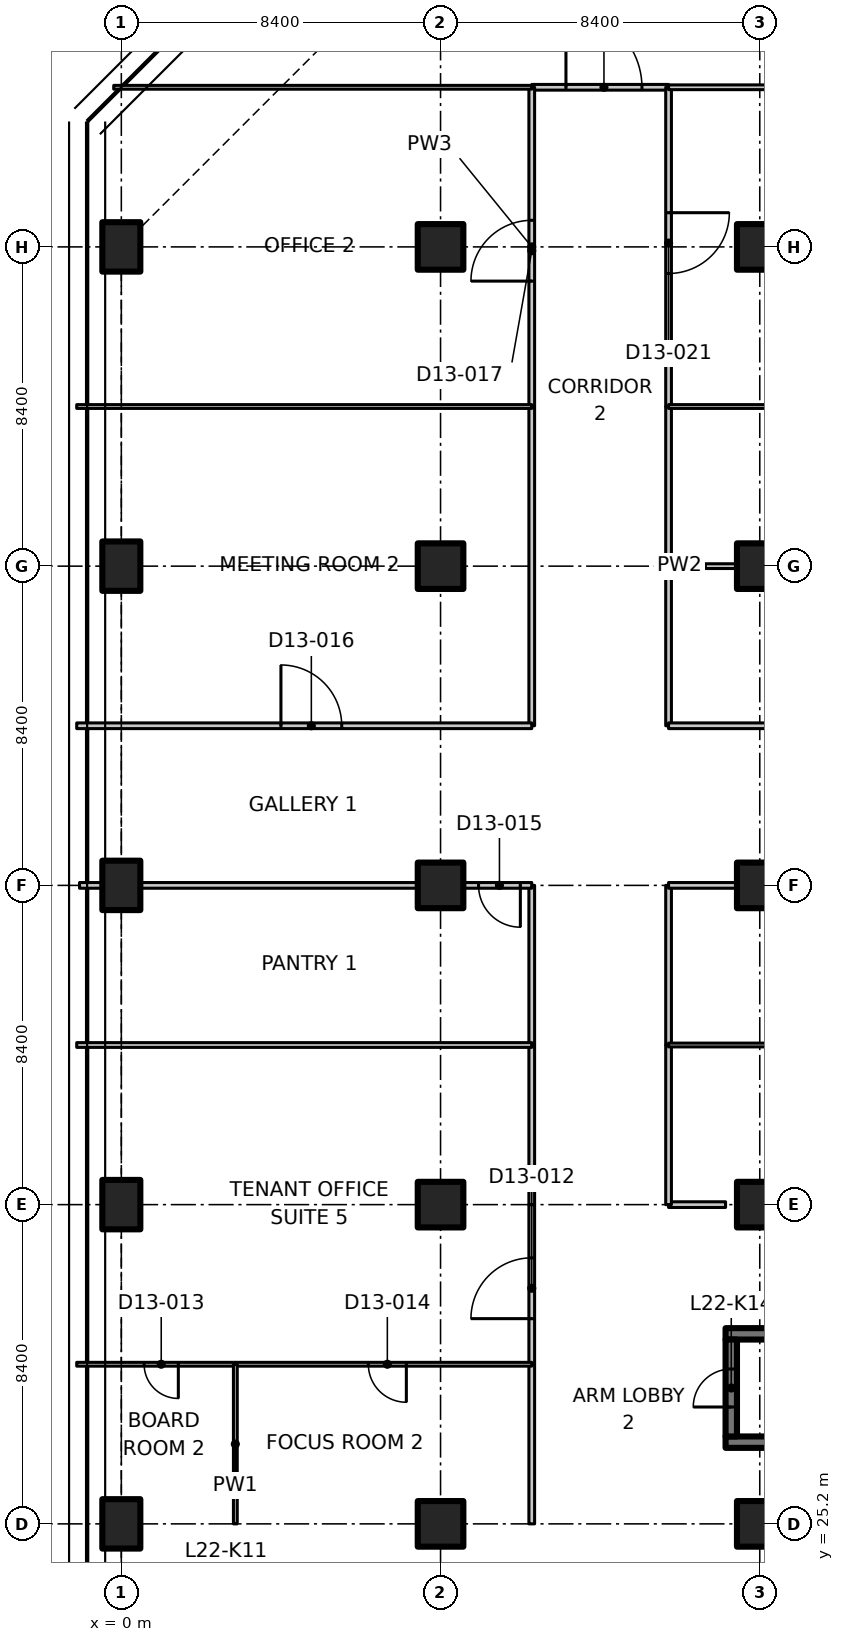
"""IFC4 building model, lengths in metres.
Left out: names, types, materials, properties, quantities, classifications, styles, units other than length and angle.
Written with IfcOpenShell. Run it as: python <this file> out.ifc"""

import sys

from ifc_helpers import new_model, si_unit, direction, frame, frame_2d, origin, origin_2d, place, context, subcontext, project, spatial, polyline, rectangle, outline, extrude, element, fill, save


model = new_model("IFC4")
c1 = context("Model", 3, precision=1e-05, world=origin(), true_north=direction((0.0, 1.0)))
c2 = subcontext(c1, "Body", "Model", "MODEL_VIEW")
j1 = project(units=[si_unit("LENGTHUNIT", "METRE"), si_unit("PLANEANGLEUNIT", "RADIAN")], contexts=[c1])
p1 = place(None, origin())
s1 = spatial("IfcSite", under=j1, at=p1, CompositionType="ELEMENT")
p2 = place(p1, origin())
s2 = spatial("IfcBuilding", under=s1, at=p2, CompositionType="ELEMENT")
p3 = place(p2, frame((0.0, 0.0, 95.3)))
s3 = spatial("IfcBuildingStorey", under=s2, at=p3, CompositionType="ELEMENT", Elevation=95.3)
for number, where, z_axis, x_axis in (
    (1, (0.0, 25.2, 0.0), (0.0, 0.0, 1.0), (1.0, 0.0, 0.0)),
    (2, (0.0, 33.6, 0.0), (0.0, 0.0, 1.0), (1.0, 0.0, 0.0)),
    (3, (0.0, 42.0, 0.0), (0.0, 0.0, 1.0), (1.0, 0.0, 0.0)),
    (4, (0.0, 50.4, 0.0), (0.0, 0.0, 1.0), (1.0, 0.0, 0.0)),
    (5, (0.0, 58.8, 0.0), (0.0, 0.0, 1.0), (1.0, 0.0, 0.0)),
):
    element("IfcColumn", number, at=place(p3, frame(where, z_axis=z_axis, x_axis=x_axis)), inside=s3, PredefinedType="COLUMN", context=c2, shape_type="SweptSolid", body=[
        extrude(rectangle(XDim=1.0, YDim=1.3, at=origin_2d()), origin(), (0.0, 0.0, 1.0), 3.35),
    ])
for number, where, z_axis, x_axis in (
    (6, (8.4, 25.2, 0.0), (0.0, 0.0, 1.0), (1.0, 0.0, 0.0)),
    (7, (8.4, 33.6, 0.0), (0.0, 0.0, 1.0), (1.0, 0.0, 0.0)),
    (8, (8.4, 42.0, 0.0), (0.0, 0.0, 1.0), (1.0, 0.0, 0.0)),
    (9, (8.4, 50.4, 0.0), (0.0, 0.0, 1.0), (1.0, 0.0, 0.0)),
    (10, (8.4, 58.8, 0.0), (0.0, 0.0, 1.0), (1.0, 0.0, 0.0)),
    (11, (16.8, 25.2, 0.0), (0.0, 0.0, 1.0), (1.0, 0.0, 0.0)),
    (12, (16.8, 33.6, 0.0), (0.0, 0.0, 1.0), (1.0, 0.0, 0.0)),
    (13, (16.8, 42.0, 0.0), (0.0, 0.0, 1.0), (1.0, 0.0, 0.0)),
    (14, (16.8, 50.4, 0.0), (0.0, 0.0, 1.0), (1.0, 0.0, 0.0)),
    (15, (16.8, 58.8, 0.0), (0.0, 0.0, 1.0), (1.0, 0.0, 0.0)),
):
    element("IfcColumn", number, at=place(p3, frame(where, z_axis=z_axis, x_axis=x_axis)), inside=s3, PredefinedType="COLUMN", context=c2, shape_type="SweptSolid", body=[
        extrude(rectangle(XDim=1.2, YDim=1.2, at=origin_2d()), origin(), (0.0, 0.0, 1.0), 3.35),
    ])
for number, where, z_axis, x_axis in (
    (16, (15.9, 27.35, 0.0), (0.0, 0.0, 1.0), (1.0, 0.0, 0.0)),
    (17, (15.9, 30.2, 0.0), (0.0, 0.0, 1.0), (1.0, 0.0, 0.0)),
):
    element("IfcWall", number, at=place(p3, frame(where, z_axis=z_axis, x_axis=x_axis)), inside=s3, PredefinedType="SHEAR", context=c2, shape_type="SweptSolid", body=[
        extrude(rectangle(XDim=8.2, YDim=0.3, at=frame_2d((4.1, 0.0))), origin(), (0.0, 0.0, 1.0), 3.35),
    ])
p4 = place(p3, frame((16.05, 27.5, 0.0), z_axis=(0.0, 0.0, 1.0), x_axis=(0.0, 1.0, 0.0)))
e18 = element("IfcWall", 18, at=p4, inside=s3, PredefinedType="SHEAR", context=c2, shape_type="SweptSolid", body=[
    extrude(rectangle(XDim=2.55, YDim=0.3, at=frame_2d((1.275, 0.0))), origin(), (0.0, 0.0, 1.0), 3.35),
])
p5 = place(p4, frame((0.775, 0.0, 0.0)))
e19 = element("IfcOpeningElement", 19, at=p5, cuts=e18, PredefinedType="OPENING", context=c2, shape_type="SweptSolid", body=[
    extrude(rectangle(XDim=1.0, YDim=2.1, at=frame_2d((0.5, 1.05))), frame((0.0, 0.16, 0.0), z_axis=(0.0, -1.0, 0.0), x_axis=(1.0, 0.0, 0.0)), (0.0, 0.0, 1.0), 0.32),
])
p6 = place(p3, frame((10.8, 29.4, 0.0), z_axis=(0.0, 0.0, 1.0), x_axis=(0.0, 1.0, 0.0)))
e20 = element("IfcWall", 20, at=p6, inside=s3, PredefinedType="PARTITIONING", context=c2, shape_type="SweptSolid", body=[
    extrude(rectangle(XDim=4.2, YDim=0.15, at=frame_2d((2.1, 0.0))), origin(), (0.0, 0.0, 1.0), 3.33),
])
p7 = place(p6, frame((1.2, 0.0, 0.0)))
e21 = element("IfcOpeningElement", 21, at=p7, cuts=e20, PredefinedType="OPENING", context=c2, shape_type="SweptSolid", body=[
    extrude(rectangle(XDim=1.6, YDim=2.1, at=frame_2d((0.8, 1.05))), frame((0.0, 0.085, 0.0), z_axis=(0.0, -1.0, 0.0), x_axis=(1.0, 0.0, 0.0)), (0.0, 0.0, 1.0), 0.17),
])
p8 = place(p3, frame((10.8, 25.2, 0.0), z_axis=(0.0, 0.0, 1.0), x_axis=(0.0, 1.0, 0.0)))
e22 = element("IfcWall", 22, at=p8, inside=s3, PredefinedType="PARTITIONING", context=c2, shape_type="SweptSolid", body=[
    extrude(rectangle(XDim=4.2, YDim=0.15, at=frame_2d((2.1, 0.0))), origin(), (0.0, 0.0, 1.0), 3.33),
])
p9 = place(p3, frame((14.4, 33.6, 0.0), z_axis=(0.0, 0.0, 1.0), x_axis=(1.0, 0.0, 0.0)))
e23 = element("IfcWall", 23, at=p9, inside=s3, PredefinedType="PARTITIONING", context=c2, shape_type="SweptSolid", body=[
    extrude(rectangle(XDim=1.5, YDim=0.15, at=frame_2d((0.75, 0.0))), origin(), (0.0, 0.0, 1.0), 3.33),
])
p10 = place(p3, frame((10.8, 63.0, 0.0), z_axis=(0.0, 0.0, 1.0), x_axis=(1.0, 0.0, 0.0)))
e24 = element("IfcWall", 24, at=p10, inside=s3, PredefinedType="PARTITIONING", context=c2, shape_type="SweptSolid", body=[
    extrude(rectangle(XDim=3.6, YDim=0.15, at=frame_2d((1.8, 0.0))), origin(), (0.0, 0.0, 1.0), 3.33),
])
p11 = place(p10, frame((0.9, 0.0, 0.0)))
e25 = element("IfcOpeningElement", 25, at=p11, cuts=e24, PredefinedType="OPENING", context=c2, shape_type="SweptSolid", body=[
    extrude(rectangle(XDim=2.0, YDim=2.4, at=frame_2d((1.0, 1.2))), frame((0.0, 0.085, 0.0), z_axis=(0.0, -1.0, 0.0), x_axis=(1.0, 0.0, 0.0)), (0.0, 0.0, 1.0), 0.17),
])
for number, where, z_axis, x_axis in (
    (26, (10.8, 33.6, 0.0), (0.0, 0.0, 1.0), (0.0, 1.0, 0.0)),
    (27, (10.8, 37.8, 0.0), (0.0, 0.0, 1.0), (0.0, 1.0, 0.0)),
):
    element("IfcWall", number, at=place(p3, frame(where, z_axis=z_axis, x_axis=x_axis)), inside=s3, PredefinedType="PARTITIONING", context=c2, shape_type="SweptSolid", body=[
        extrude(rectangle(XDim=4.2, YDim=0.15, at=frame_2d((2.1, 0.0))), origin(), (0.0, 0.0, 1.0), 3.33),
    ])
p12 = place(p3, frame((10.8, 46.2, 0.0), z_axis=(0.0, 0.0, 1.0), x_axis=(0.0, 1.0, 0.0)))
e28 = element("IfcWall", 28, at=p12, inside=s3, PredefinedType="PARTITIONING", context=c2, shape_type="SweptSolid", body=[
    extrude(rectangle(XDim=8.4, YDim=0.15, at=frame_2d((4.2, 0.0))), origin(), (0.0, 0.0, 1.0), 3.33),
])
p13 = place(p3, frame((10.8, 54.6, 0.0), z_axis=(0.0, 0.0, 1.0), x_axis=(0.0, 1.0, 0.0)))
e29 = element("IfcWall", 29, at=p13, inside=s3, PredefinedType="PARTITIONING", context=c2, shape_type="SweptSolid", body=[
    extrude(rectangle(XDim=8.4, YDim=0.15, at=frame_2d((4.2, 0.0))), origin(), (0.0, 0.0, 1.0), 3.33),
])
p14 = place(p13, frame((3.3, 0.0, 0.0)))
e30 = element("IfcOpeningElement", 30, at=p14, cuts=e29, PredefinedType="OPENING", context=c2, shape_type="SweptSolid", body=[
    extrude(rectangle(XDim=1.6, YDim=2.1, at=frame_2d((0.8, 1.05))), frame((0.0, 0.085, 0.0), z_axis=(0.0, -1.0, 0.0), x_axis=(1.0, 0.0, 0.0)), (0.0, 0.0, 1.0), 0.17),
])
for number, where, z_axis, x_axis in (
    (31, (14.4, 37.8, 0.0), (0.0, 0.0, 1.0), (0.0, -1.0, 0.0)),
    (32, (14.4, 42.0, 0.0), (0.0, 0.0, 1.0), (0.0, -1.0, 0.0)),
    (33, (14.4, 50.4, 0.0), (0.0, 0.0, 1.0), (0.0, -1.0, 0.0)),
):
    element("IfcWall", number, at=place(p3, frame(where, z_axis=z_axis, x_axis=x_axis)), inside=s3, PredefinedType="PARTITIONING", context=c2, shape_type="SweptSolid", body=[
        extrude(rectangle(XDim=4.2, YDim=0.15, at=frame_2d((2.1, 0.0))), origin(), (0.0, 0.0, 1.0), 3.33),
    ])
p15 = place(p3, frame((14.4, 63.0, 0.0), z_axis=(0.0, 0.0, 1.0), x_axis=(0.0, -1.0, 0.0)))
e34 = element("IfcWall", 34, at=p15, inside=s3, PredefinedType="PARTITIONING", context=c2, shape_type="SweptSolid", body=[
    extrude(rectangle(XDim=8.4, YDim=0.15, at=frame_2d((4.2, 0.0))), origin(), (0.0, 0.0, 1.0), 3.33),
])
p16 = place(p15, frame((3.3, 0.0, 0.0)))
e35 = element("IfcOpeningElement", 35, at=p16, cuts=e34, PredefinedType="OPENING", context=c2, shape_type="SweptSolid", body=[
    extrude(rectangle(XDim=1.6, YDim=2.1, at=frame_2d((0.8, 1.05))), frame((0.0, 0.085, 0.0), z_axis=(0.0, -1.0, 0.0), x_axis=(1.0, 0.0, 0.0)), (0.0, 0.0, 1.0), 0.17),
])
p17 = place(p3, frame((14.4, 54.6, 0.0), z_axis=(0.0, 0.0, 1.0), x_axis=(0.0, -1.0, 0.0)))
e36 = element("IfcWall", 36, at=p17, inside=s3, PredefinedType="PARTITIONING", context=c2, shape_type="SweptSolid", body=[
    extrude(rectangle(XDim=4.2, YDim=0.15, at=frame_2d((2.1, 0.0))), origin(), (0.0, 0.0, 1.0), 3.33),
])
p18 = place(p3, frame((10.8, 63.0, 0.0), z_axis=(0.0, 0.0, 1.0), x_axis=(-1.0, 0.0, 0.0)))
e37 = element("IfcWall", 37, at=p18, inside=s3, PredefinedType="PARTITIONING", context=c2, shape_type="SweptSolid", body=[
    extrude(outline(polyline([(0.0, 0.0), (11.0, 0.0), (11.0, 3.33), (7.266, 3.33), (7.264, 2.98), (5.936, 2.98), (5.934, 3.33), (0.0, 3.33), (0.0, 0.0)])), frame((0.0, 0.05, 0.0), z_axis=(0.0, -1.0, 0.0), x_axis=(1.0, 0.0, 0.0)), (0.0, 0.0, 1.0), 0.1),
])
p19 = place(p3, frame((25.4, 63.0, 0.0), z_axis=(0.0, 0.0, 1.0), x_axis=(-1.0, 0.0, 0.0)))
e38 = element("IfcWall", 38, at=p19, inside=s3, PredefinedType="PARTITIONING", context=c2, shape_type="SweptSolid", body=[
    extrude(outline(polyline([(0.0, 0.0), (11.0, 0.0), (11.0, 3.33), (5.078, 3.33), (5.076, 2.98), (3.724, 2.98), (3.722, 3.33), (0.0, 3.33), (0.0, 0.0)])), frame((0.0, 0.062, 0.0), z_axis=(0.0, -1.0, 0.0), x_axis=(1.0, 0.0, 0.0)), (0.0, 0.0, 1.0), 0.125),
])
p20 = place(p3, frame((10.8, 42.0, 0.0), z_axis=(0.0, 0.0, 1.0), x_axis=(-1.0, 0.0, 0.0)))
e39 = element("IfcWall", 39, at=p20, inside=s3, PredefinedType="PARTITIONING", context=c2, shape_type="SweptSolid", body=[
    extrude(rectangle(XDim=1.78, YDim=0.15, at=frame_2d((0.89, 0.0))), origin(), (0.0, 0.0, 1.0), 3.33),
])
p21 = place(p20, frame((0.3, 0.0, 0.0)))
e40 = element("IfcOpeningElement", 40, at=p21, cuts=e39, PredefinedType="OPENING", context=c2, shape_type="SweptSolid", body=[
    extrude(rectangle(XDim=1.1, YDim=2.1, at=frame_2d((0.55, 1.05))), frame((0.0, 0.085, 0.0), z_axis=(0.0, -1.0, 0.0), x_axis=(1.0, 0.0, 0.0)), (0.0, 0.0, 1.0), 0.17),
])
p22 = place(p3, frame((7.78, 42.0, 0.0), z_axis=(0.0, 0.0, 1.0), x_axis=(-1.0, 0.0, 0.0)))
e41 = element("IfcWall", 41, at=p22, inside=s3, PredefinedType="PARTITIONING", context=c2, shape_type="SweptSolid", body=[
    extrude(rectangle(XDim=7.26, YDim=0.15, at=frame_2d((3.63, 0.0))), origin(), (0.0, 0.0, 1.0), 3.33),
])
p23 = place(p3, frame((-0.52, 42.0, 0.0), z_axis=(0.0, 0.0, 1.0), x_axis=(-1.0, 0.0, 0.0)))
e42 = element("IfcWall", 42, at=p23, inside=s3, PredefinedType="PARTITIONING", context=c2, shape_type="SweptSolid", body=[
    extrude(rectangle(XDim=0.58, YDim=0.15, at=frame_2d((0.29, 0.0))), origin(), (0.0, 0.0, 1.0), 3.33),
])
p24 = place(p3, frame((-1.174, 46.2, 0.0), z_axis=(0.0, 0.0, 1.0), x_axis=(1.0, 0.0, 0.0)))
e43 = element("IfcWall", 43, at=p24, inside=s3, PredefinedType="PARTITIONING", context=c2, shape_type="SweptSolid", body=[
    extrude(outline(polyline([(0.0, 0.0), (11.974, 0.0), (11.974, 3.33), (1.624, 3.33), (1.622, 2.98), (0.726, 2.98), (0.724, 3.33), (0.074, 3.33), (0.0, 3.33), (0.0, 0.0)])), frame((0.0, 0.075, 0.0), z_axis=(0.0, -1.0, 0.0), x_axis=(1.0, 0.0, 0.0)), (0.0, 0.0, 1.0), 0.15),
])
p25 = place(p24, frame((5.374, 0.0, 0.0)))
e44 = element("IfcOpeningElement", 44, at=p25, cuts=e43, PredefinedType="OPENING", context=c2, shape_type="SweptSolid", body=[
    extrude(rectangle(XDim=1.6, YDim=2.1, at=frame_2d((0.8, 1.05))), frame((0.0, 0.085, 0.0), z_axis=(0.0, -1.0, 0.0), x_axis=(1.0, 0.0, 0.0)), (0.0, 0.0, 1.0), 0.17),
])
p26 = place(p3, frame((3.0, 29.4, 0.0), z_axis=(0.0, 0.0, 1.0), x_axis=(-1.0, 0.0, 0.0)))
e45 = element("IfcWall", 45, at=p26, inside=s3, PredefinedType="PARTITIONING", context=c2, shape_type="SweptSolid", body=[
    extrude(rectangle(XDim=4.174, YDim=0.1, at=frame_2d((2.087, 0.0))), origin(), (0.0, 0.0, 1.0), 2.98),
])
p27 = place(p26, frame((1.5, 0.0, 0.0)))
e46 = element("IfcOpeningElement", 46, at=p27, cuts=e45, PredefinedType="OPENING", context=c2, shape_type="SweptSolid", body=[
    extrude(rectangle(XDim=0.9, YDim=2.1, at=frame_2d((0.45, 1.05))), frame((0.0, 0.06, 0.0), z_axis=(0.0, -1.0, 0.0), x_axis=(1.0, 0.0, 0.0)), (0.0, 0.0, 1.0), 0.12),
])
p28 = place(p3, frame((10.8, 29.4, 0.0), z_axis=(0.0, 0.0, 1.0), x_axis=(-1.0, 0.0, 0.0)))
e47 = element("IfcWall", 47, at=p28, inside=s3, PredefinedType="PARTITIONING", context=c2, shape_type="SweptSolid", body=[
    extrude(rectangle(XDim=7.8, YDim=0.1, at=frame_2d((3.9, 0.0))), origin(), (0.0, 0.0, 1.0), 3.33),
])
p29 = place(p28, frame((3.3, 0.0, 0.0)))
e48 = element("IfcOpeningElement", 48, at=p29, cuts=e47, PredefinedType="OPENING", context=c2, shape_type="SweptSolid", body=[
    extrude(rectangle(XDim=1.0, YDim=2.1, at=frame_2d((0.5, 1.05))), frame((0.0, 0.06, 0.0), z_axis=(0.0, -1.0, 0.0), x_axis=(1.0, 0.0, 0.0)), (0.0, 0.0, 1.0), 0.12),
])
p30 = place(p3, frame((-1.174, 37.8, 0.0), z_axis=(0.0, 0.0, 1.0), x_axis=(1.0, 0.0, 0.0)))
e49 = element("IfcWall", 49, at=p30, inside=s3, PredefinedType="PARTITIONING", context=c2, shape_type="SweptSolid", body=[
    extrude(outline(polyline([(0.0, 0.0), (11.974, 0.0), (11.974, 3.33), (1.624, 3.33), (1.622, 2.98), (0.726, 2.98), (0.724, 3.33), (0.074, 3.33), (0.0, 3.33), (0.0, 0.0)])), frame((0.0, 0.062, 0.0), z_axis=(0.0, -1.0, 0.0), x_axis=(1.0, 0.0, 0.0)), (0.0, 0.0, 1.0), 0.125),
])
p31 = place(p3, frame((3.0, 29.4, 0.0), z_axis=(0.0, 0.0, 1.0), x_axis=(0.0, -1.0, 0.0)))
e50 = element("IfcWall", 50, at=p31, inside=s3, PredefinedType="PARTITIONING", context=c2, shape_type="SweptSolid", body=[
    extrude(rectangle(XDim=4.2, YDim=0.1, at=frame_2d((2.1, 0.0))), origin(), (0.0, 0.0, 1.0), 3.33),
])
p32 = place(p3, frame((-1.174, 54.6, 0.0), z_axis=(0.0, 0.0, 1.0), x_axis=(1.0, 0.0, 0.0)))
e51 = element("IfcWall", 51, at=p32, inside=s3, PredefinedType="PARTITIONING", context=c2, shape_type="SweptSolid", body=[
    extrude(outline(polyline([(0.0, 0.0), (11.974, 0.0), (11.974, 3.33), (1.624, 3.33), (1.622, 2.98), (0.726, 2.98), (0.724, 3.33), (0.074, 3.33), (0.0, 3.33), (0.0, 0.0)])), frame((0.0, 0.05, 0.0), z_axis=(0.0, -1.0, 0.0), x_axis=(1.0, 0.0, 0.0)), (0.0, 0.0, 1.0), 0.1),
])
p33 = place(p3, frame((16.18, 42.0, 0.0), z_axis=(0.0, 0.0, 1.0), x_axis=(-1.0, 0.0, 0.0)))
e52 = element("IfcWall", 52, at=p33, inside=s3, PredefinedType="PARTITIONING", context=c2, shape_type="SweptSolid", body=[
    extrude(rectangle(XDim=1.78, YDim=0.15, at=frame_2d((0.89, 0.0))), origin(), (0.0, 0.0, 1.0), 3.33),
])
p34 = place(p3, frame((14.4, 46.2, 0.0), z_axis=(0.0, 0.0, 1.0), x_axis=(1.0, 0.0, 0.0)))
e53 = element("IfcWall", 53, at=p34, inside=s3, PredefinedType="PARTITIONING", context=c2, shape_type="SweptSolid", body=[
    extrude(outline(polyline([(0.0, 0.0), (11.974, 0.0), (11.974, 3.33), (11.9, 3.33), (11.25, 3.33), (11.248, 2.98), (10.352, 2.98), (10.35, 3.33), (0.0, 3.33), (0.0, 0.0)])), frame((0.0, 0.075, 0.0), z_axis=(0.0, -1.0, 0.0), x_axis=(1.0, 0.0, 0.0)), (0.0, 0.0, 1.0), 0.15),
])
p35 = place(p34, frame((5.4, 0.0, 0.0)))
e54 = element("IfcOpeningElement", 54, at=p35, cuts=e53, PredefinedType="OPENING", context=c2, shape_type="SweptSolid", body=[
    extrude(rectangle(XDim=1.1, YDim=2.1, at=frame_2d((0.55, 1.05))), frame((0.0, 0.085, 0.0), z_axis=(0.0, -1.0, 0.0), x_axis=(1.0, 0.0, 0.0)), (0.0, 0.0, 1.0), 0.17),
])
p36 = place(p3, frame((14.4, 37.8, 0.0), z_axis=(0.0, 0.0, 1.0), x_axis=(1.0, 0.0, 0.0)))
e55 = element("IfcWall", 55, at=p36, inside=s3, PredefinedType="PARTITIONING", context=c2, shape_type="SweptSolid", body=[
    extrude(outline(polyline([(0.0, 0.0), (15.843, 0.0), (15.843, 3.33), (11.25, 3.33), (11.248, 2.98), (10.352, 2.98), (10.35, 3.33), (0.0, 3.33), (0.0, 0.0)])), frame((0.0, 0.05, 0.0), z_axis=(0.0, -1.0, 0.0), x_axis=(1.0, 0.0, 0.0)), (0.0, 0.0, 1.0), 0.1),
])
p37 = place(p3, frame((14.4, 50.4, 0.0), z_axis=(0.0, 0.0, 1.0), x_axis=(1.0, 0.0, 0.0)))
e56 = element("IfcWall", 56, at=p37, inside=s3, PredefinedType="PARTITIONING", context=c2, shape_type="SweptSolid", body=[
    extrude(rectangle(XDim=1.78, YDim=0.125, at=frame_2d((0.89, 0.0))), origin(), (0.0, 0.0, 1.0), 3.33),
])
p38 = place(p3, frame((24.0, 54.6, 0.0), z_axis=(0.0, 0.0, 1.0), x_axis=(-1.0, 0.0, 0.0)))
e57 = element("IfcWall", 57, at=p38, inside=s3, PredefinedType="PARTITIONING", context=c2, shape_type="SweptSolid", body=[
    extrude(rectangle(XDim=9.6, YDim=0.1, at=frame_2d((4.8, 0.0))), origin(), (0.0, 0.0, 1.0), 3.33),
])
p39 = place(p38, frame((4.2, 0.0, 0.0)))
e58 = element("IfcOpeningElement", 58, at=p39, cuts=e57, PredefinedType="OPENING", context=c2, shape_type="SweptSolid", body=[
    extrude(rectangle(XDim=1.2, YDim=2.1, at=frame_2d((0.6, 1.05))), frame((0.0, 0.06, 0.0), z_axis=(0.0, -1.0, 0.0), x_axis=(1.0, 0.0, 0.0)), (0.0, 0.0, 1.0), 0.12),
])
p40 = place(p5, origin())
e59 = element("IfcDoor", 59, at=p40, inside=s3, OperationType="SINGLE_SWING_LEFT", PredefinedType="DOOR", context=c2, shape_type="SweptSolid", body=[
    extrude(rectangle(XDim=1.0, YDim=2.1, at=frame_2d((0.5, 1.05))), frame((0.0, 0.025, 0.0), z_axis=(0.0, -1.0, 0.0), x_axis=(1.0, 0.0, 0.0)), (0.0, 0.0, 1.0), 0.05),
])
fill(e19, e59)
p41 = place(p11, origin())
e60 = element("IfcDoor", 60, at=p41, inside=s3, OperationType="DOUBLE_DOOR_SINGLE_SWING", PredefinedType="DOOR", context=c2, shape_type="SweptSolid", body=[
    extrude(rectangle(XDim=2.0, YDim=2.4, at=frame_2d((1.0, 1.2))), frame((0.0, 0.025, 0.0), z_axis=(0.0, -1.0, 0.0), x_axis=(1.0, 0.0, 0.0)), (0.0, 0.0, 1.0), 0.05),
])
fill(e25, e60)
p42 = place(p7, origin())
e61 = element("IfcDoor", 61, at=p42, inside=s3, OperationType="DOUBLE_DOOR_SINGLE_SWING", PredefinedType="DOOR", context=c2, shape_type="SweptSolid", body=[
    extrude(rectangle(XDim=1.6, YDim=2.1, at=frame_2d((0.8, 1.05))), frame((0.0, 0.025, 0.0), z_axis=(0.0, -1.0, 0.0), x_axis=(1.0, 0.0, 0.0)), (0.0, 0.0, 1.0), 0.05),
])
fill(e21, e61)
p43 = place(p27, origin())
e62 = element("IfcDoor", 62, at=p43, inside=s3, OperationType="SINGLE_SWING_LEFT", PredefinedType="DOOR", context=c2, shape_type="SweptSolid", body=[
    extrude(rectangle(XDim=0.9, YDim=2.1, at=frame_2d((0.45, 1.05))), frame((0.0, 0.025, 0.0), z_axis=(0.0, -1.0, 0.0), x_axis=(1.0, 0.0, 0.0)), (0.0, 0.0, 1.0), 0.05),
])
fill(e46, e62)
p44 = place(p29, origin())
e63 = element("IfcDoor", 63, at=p44, inside=s3, OperationType="SINGLE_SWING_LEFT", PredefinedType="DOOR", context=c2, shape_type="SweptSolid", body=[
    extrude(rectangle(XDim=1.0, YDim=2.1, at=frame_2d((0.5, 1.05))), frame((0.0, 0.025, 0.0), z_axis=(0.0, -1.0, 0.0), x_axis=(1.0, 0.0, 0.0)), (0.0, 0.0, 1.0), 0.05),
])
fill(e48, e63)
p45 = place(p21, origin())
e64 = element("IfcDoor", 64, at=p45, inside=s3, OperationType="SINGLE_SWING_LEFT", PredefinedType="DOOR", context=c2, shape_type="SweptSolid", body=[
    extrude(rectangle(XDim=1.1, YDim=2.1, at=frame_2d((0.55, 1.05))), frame((0.0, 0.025, 0.0), z_axis=(0.0, -1.0, 0.0), x_axis=(1.0, 0.0, 0.0)), (0.0, 0.0, 1.0), 0.05),
])
fill(e40, e64)
p46 = place(p25, origin())
e65 = element("IfcDoor", 65, at=p46, inside=s3, OperationType="DOUBLE_DOOR_SINGLE_SWING", PredefinedType="DOOR", context=c2, shape_type="SweptSolid", body=[
    extrude(rectangle(XDim=1.6, YDim=2.1, at=frame_2d((0.8, 1.05))), frame((0.0, 0.025, 0.0), z_axis=(0.0, -1.0, 0.0), x_axis=(1.0, 0.0, 0.0)), (0.0, 0.0, 1.0), 0.05),
])
fill(e44, e65)
p47 = place(p14, origin())
e66 = element("IfcDoor", 66, at=p47, inside=s3, OperationType="DOUBLE_DOOR_SINGLE_SWING", PredefinedType="DOOR", context=c2, shape_type="SweptSolid", body=[
    extrude(rectangle(XDim=1.6, YDim=2.1, at=frame_2d((0.8, 1.05))), frame((0.0, 0.025, 0.0), z_axis=(0.0, -1.0, 0.0), x_axis=(1.0, 0.0, 0.0)), (0.0, 0.0, 1.0), 0.05),
])
fill(e30, e66)
p48 = place(p16, origin())
e67 = element("IfcDoor", 67, at=p48, inside=s3, OperationType="DOUBLE_DOOR_SINGLE_SWING", PredefinedType="DOOR", context=c2, shape_type="SweptSolid", body=[
    extrude(rectangle(XDim=1.6, YDim=2.1, at=frame_2d((0.8, 1.05))), frame((0.0, 0.025, 0.0), z_axis=(0.0, -1.0, 0.0), x_axis=(1.0, 0.0, 0.0)), (0.0, 0.0, 1.0), 0.05),
])
fill(e35, e67)
save(model, sys.argv[1])
